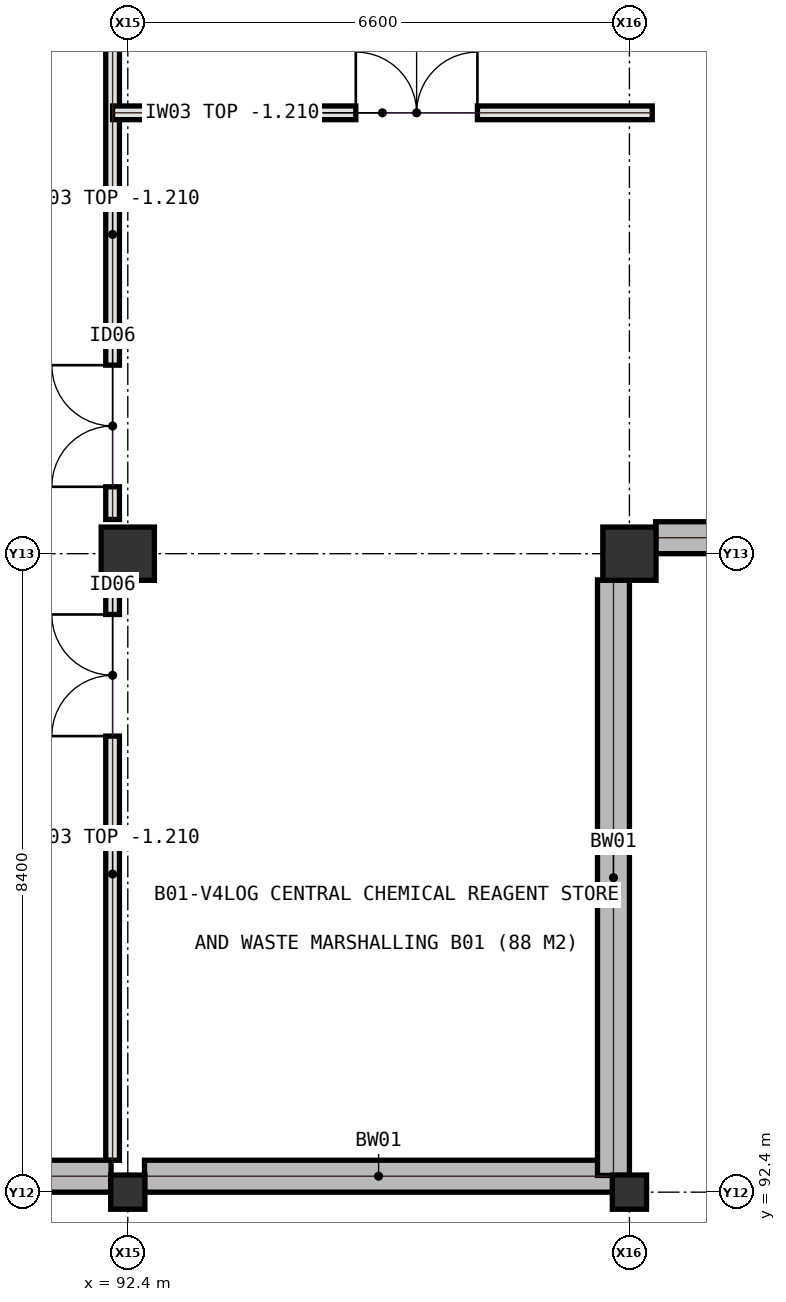
"""IFC4 building model, lengths in metres.
Left out: names, types, materials, properties, quantities, classifications, styles, units other than length and angle.
Written with IfcOpenShell. Run it as: python <this file> out.ifc"""

import sys

from ifc_helpers import new_model, si_unit, direction, frame, frame_2d, origin, origin_2d, place, context, subcontext, project, spatial, rectangle, extrude, element, fill, save


model = new_model("IFC4")
c1 = context("Model", 3, precision=1e-05, world=origin(), true_north=direction((0.0, 1.0)))
c2 = subcontext(c1, "Body", "Model", "MODEL_VIEW")
j1 = project(units=[si_unit("LENGTHUNIT", "METRE"), si_unit("PLANEANGLEUNIT", "RADIAN")], contexts=[c1])
p1 = place(None, origin())
s1 = spatial("IfcSite", under=j1, at=p1, CompositionType="ELEMENT")
p2 = place(p1, origin())
s2 = spatial("IfcBuilding", under=s1, at=p2, CompositionType="ELEMENT")
p3 = place(p2, frame((0.0, 0.0, -4.5)))
s3 = spatial("IfcBuildingStorey", under=s2, at=p3, CompositionType="ELEMENT", Elevation=-4.5)
p4 = place(p3, frame((92.4, 92.4, 0.0), z_axis=(0.0, 0.0, 1.0), x_axis=(1.0, 0.0, 0.0)))
e1 = element("IfcColumn", 1, at=p4, inside=s3, PredefinedType="COLUMN", context=c2, shape_type="SweptSolid", body=[
    extrude(rectangle(XDim=0.45, YDim=0.45, at=origin_2d()), origin(), (0.0, 0.0, 1.0), 4.5),
])
p5 = place(p3, frame((92.4, 100.8, 0.0), z_axis=(0.0, 0.0, 1.0), x_axis=(1.0, 0.0, 0.0)))
e2 = element("IfcColumn", 2, at=p5, inside=s3, PredefinedType="COLUMN", context=c2, shape_type="SweptSolid", body=[
    extrude(rectangle(XDim=0.7, YDim=0.7, at=origin_2d()), origin(), (0.0, 0.0, 1.0), 4.5),
])
p6 = place(p3, frame((99.0, 92.4, 0.0), z_axis=(0.0, 0.0, 1.0), x_axis=(1.0, 0.0, 0.0)))
e3 = element("IfcColumn", 3, at=p6, inside=s3, PredefinedType="COLUMN", context=c2, shape_type="SweptSolid", body=[
    extrude(rectangle(XDim=0.45, YDim=0.45, at=origin_2d()), origin(), (0.0, 0.0, 1.0), 4.5),
])
p7 = place(p3, frame((99.0, 100.8, 0.0), z_axis=(0.0, 0.0, 1.0), x_axis=(1.0, 0.0, 0.0)))
e4 = element("IfcColumn", 4, at=p7, inside=s3, PredefinedType="COLUMN", context=c2, shape_type="SweptSolid", body=[
    extrude(rectangle(XDim=0.7, YDim=0.7, at=origin_2d()), origin(), (0.0, 0.0, 1.0), 4.5),
])
p8 = place(p3, frame((92.2, 92.82, 0.0), z_axis=(0.0, 0.0, 1.0), x_axis=(0.0, 1.0, 0.0)))
e5 = element("IfcWall", 5, at=p8, inside=s3, PredefinedType="SOLIDWALL", context=c2, shape_type="SweptSolid", body=[
    extrude(rectangle(XDim=7.53, YDim=0.18, at=frame_2d((3.765, 0.0))), origin(), (0.0, 0.0, 1.0), 3.29),
])
p9 = place(p8, frame((5.58, 0.0, 0.0)))
e6 = element("IfcOpeningElement", 6, at=p9, cuts=e5, PredefinedType="OPENING", context=c2, shape_type="SweptSolid", body=[
    extrude(rectangle(XDim=1.6, YDim=2.2, at=frame_2d((0.8, 1.1))), frame((0.0, 0.1, 0.0), z_axis=(0.0, -1.0, 0.0), x_axis=(1.0, 0.0, 0.0)), (0.0, 0.0, 1.0), 0.2),
])
p10 = place(p3, frame((92.2, 101.25, 0.0), z_axis=(0.0, 0.0, 1.0), x_axis=(0.0, 1.0, 0.0)))
e7 = element("IfcWall", 7, at=p10, inside=s3, PredefinedType="SOLIDWALL", context=c2, shape_type="SweptSolid", body=[
    extrude(rectangle(XDim=7.5, YDim=0.18, at=frame_2d((3.75, 0.0))), origin(), (0.0, 0.0, 1.0), 3.29),
])
p11 = place(p10, frame((0.43, 0.0, 0.0)))
e8 = element("IfcOpeningElement", 8, at=p11, cuts=e7, PredefinedType="OPENING", context=c2, shape_type="SweptSolid", body=[
    extrude(rectangle(XDim=1.6, YDim=2.2, at=frame_2d((0.8, 1.1))), frame((0.0, 0.1, 0.0), z_axis=(0.0, -1.0, 0.0), x_axis=(1.0, 0.0, 0.0)), (0.0, 0.0, 1.0), 0.2),
])
p12 = place(p3, frame((92.2, 106.6, 0.0), z_axis=(0.0, 0.0, 1.0), x_axis=(1.0, 0.0, 0.0)))
e9 = element("IfcWall", 9, at=p12, inside=s3, PredefinedType="SOLIDWALL", context=c2, shape_type="SweptSolid", body=[
    extrude(rectangle(XDim=7.1, YDim=0.18, at=frame_2d((3.55, 0.0))), origin(), (0.0, 0.0, 1.0), 3.29),
])
p13 = place(p12, frame((3.2, 0.0, 0.0)))
e10 = element("IfcOpeningElement", 10, at=p13, cuts=e9, PredefinedType="OPENING", context=c2, shape_type="SweptSolid", body=[
    extrude(rectangle(XDim=1.6, YDim=2.2, at=frame_2d((0.8, 1.1))), frame((0.0, 0.1, 0.0), z_axis=(0.0, -1.0, 0.0), x_axis=(1.0, 0.0, 0.0)), (0.0, 0.0, 1.0), 0.2),
])
for number, where, z_axis, x_axis in (
    (11, (86.02, 92.61, 0.0), (0.0, 0.0, 1.0), (1.0, 0.0, 0.0)),
    (12, (92.62, 92.61, 0.0), (0.0, 0.0, 1.0), (1.0, 0.0, 0.0)),
):
    element("IfcWall", number, at=place(p3, frame(where, z_axis=z_axis, x_axis=x_axis)), inside=s3, PredefinedType="SOLIDWALL", context=c2, shape_type="SweptSolid", body=[
        extrude(rectangle(XDim=6.16, YDim=0.42, at=frame_2d((3.08, 0.0))), origin(), (0.0, 0.0, 1.0), 4.14),
    ])
p14 = place(p3, frame((98.79, 92.62, 0.0), z_axis=(0.0, 0.0, 1.0), x_axis=(0.0, 1.0, 0.0)))
e13 = element("IfcWall", 13, at=p14, inside=s3, PredefinedType="SOLIDWALL", context=c2, shape_type="SweptSolid", body=[
    extrude(rectangle(XDim=7.835, YDim=0.42, at=frame_2d((3.917, 0.0))), origin(), (0.0, 0.0, 1.0), 4.14),
])
p15 = place(p3, frame((99.345, 101.01, 0.0), z_axis=(0.0, 0.0, 1.0), x_axis=(1.0, 0.0, 0.0)))
e14 = element("IfcWall", 14, at=p15, inside=s3, PredefinedType="SOLIDWALL", context=c2, shape_type="SweptSolid", body=[
    extrude(rectangle(XDim=5.91, YDim=0.42, at=frame_2d((2.955, 0.0))), origin(), (0.0, 0.0, 1.0), 4.14),
])
p16 = place(p9, origin())
e15 = element("IfcDoor", 15, at=p16, inside=s3, OperationType="DOUBLE_DOOR_SINGLE_SWING", PredefinedType="DOOR", context=c2, shape_type="SweptSolid", body=[
    extrude(rectangle(XDim=1.6, YDim=2.2, at=frame_2d((0.8, 1.1))), frame((0.0, 0.025, 0.0), z_axis=(0.0, -1.0, 0.0), x_axis=(1.0, 0.0, 0.0)), (0.0, 0.0, 1.0), 0.05),
])
fill(e6, e15)
p17 = place(p11, origin())
e16 = element("IfcDoor", 16, at=p17, inside=s3, OperationType="DOUBLE_DOOR_SINGLE_SWING", PredefinedType="DOOR", context=c2, shape_type="SweptSolid", body=[
    extrude(rectangle(XDim=1.6, YDim=2.2, at=frame_2d((0.8, 1.1))), frame((0.0, 0.025, 0.0), z_axis=(0.0, -1.0, 0.0), x_axis=(1.0, 0.0, 0.0)), (0.0, 0.0, 1.0), 0.05),
])
fill(e8, e16)
p18 = place(p13, origin())
e17 = element("IfcDoor", 17, at=p18, inside=s3, OperationType="DOUBLE_DOOR_SINGLE_SWING", PredefinedType="DOOR", context=c2, shape_type="SweptSolid", body=[
    extrude(rectangle(XDim=1.6, YDim=2.2, at=frame_2d((0.8, 1.1))), frame((0.0, 0.025, 0.0), z_axis=(0.0, -1.0, 0.0), x_axis=(1.0, 0.0, 0.0)), (0.0, 0.0, 1.0), 0.05),
])
fill(e10, e17)
save(model, sys.argv[1])
